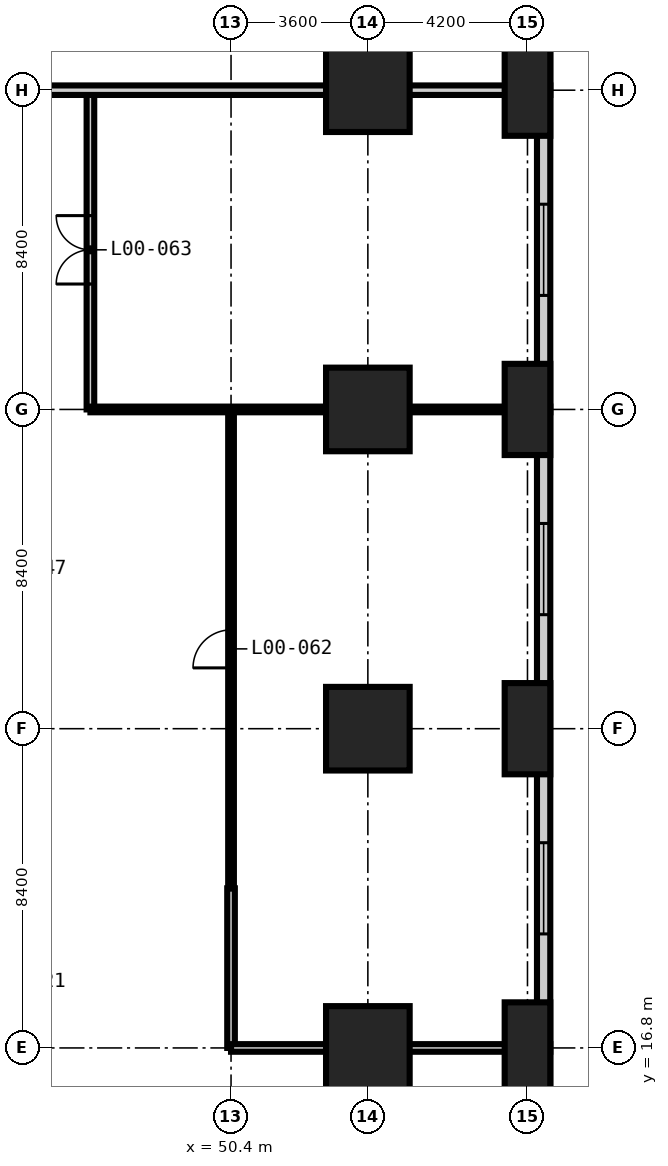
"""IFC4 building model, lengths in metres.
Left out: names, types, materials, properties, quantities, classifications, styles, units other than length and angle.
Written with IfcOpenShell. Run it as: python <this file> out.ifc"""

import sys

from ifc_helpers import new_model, si_unit, direction, frame, frame_2d, origin, origin_2d, place, context, subcontext, project, spatial, rectangle, extrude, element, fill, save


model = new_model("IFC4")
c1 = context("Model", 3, precision=1e-05, world=origin(), true_north=direction((0.0, 1.0)))
c2 = subcontext(c1, "Body", "Model", "MODEL_VIEW")
j1 = project(units=[si_unit("LENGTHUNIT", "METRE"), si_unit("PLANEANGLEUNIT", "RADIAN")], contexts=[c1])
p1 = place(None, origin())
s1 = spatial("IfcSite", under=j1, at=p1, CompositionType="ELEMENT")
p2 = place(p1, origin())
s2 = spatial("IfcBuilding", under=s1, at=p2, CompositionType="ELEMENT")
p3 = place(p2, origin())
s3 = spatial("IfcBuildingStorey", under=s2, at=p3, CompositionType="ELEMENT", Elevation=0.0)
for number, where, z_axis, x_axis in (
    (1, (54.0, 16.8, -0.3), (0.0, 0.0, 1.0), (1.0, 0.0, 0.0)),
    (2, (54.0, 25.2, -0.3), (0.0, 0.0, 1.0), (1.0, 0.0, 0.0)),
    (3, (54.0, 33.6, -0.3), (0.0, 0.0, 1.0), (1.0, 0.0, 0.0)),
    (4, (54.0, 42.0, -0.3), (0.0, 0.0, 1.0), (1.0, 0.0, 0.0)),
):
    element("IfcColumn", number, at=place(p3, frame(where, z_axis=z_axis, x_axis=x_axis)), inside=s3, PredefinedType="COLUMN", context=c2, shape_type="SweptSolid", body=[
        extrude(rectangle(XDim=2.2, YDim=2.2, at=origin_2d()), origin(), (0.0, 0.0, 1.0), 6.0),
    ])
for number, where, z_axis, x_axis in (
    (5, (58.2, 16.8, -0.3), (0.0, 0.0, 1.0), (1.0, 0.0, 0.0)),
    (6, (58.2, 25.2, -0.3), (0.0, 0.0, 1.0), (1.0, 0.0, 0.0)),
    (7, (58.2, 33.6, -0.3), (0.0, 0.0, 1.0), (1.0, 0.0, 0.0)),
    (8, (58.2, 42.0, -0.3), (0.0, 0.0, 1.0), (1.0, 0.0, 0.0)),
):
    element("IfcColumn", number, at=place(p3, frame(where, z_axis=z_axis, x_axis=x_axis)), inside=s3, PredefinedType="COLUMN", context=c2, shape_type="SweptSolid", body=[
        extrude(rectangle(XDim=1.2, YDim=2.4, at=origin_2d()), origin(), (0.0, 0.0, 1.0), 6.0),
    ])
p4 = place(p3, frame((58.625, -8.4, 0.0), z_axis=(0.0, 0.0, 1.0), x_axis=(0.0, 1.0, 0.0)))
e9 = element("IfcWall", 9, at=p4, inside=s3, PredefinedType="SOLIDWALL", context=c2, shape_type="SweptSolid", body=[
    extrude(rectangle(XDim=67.2, YDim=0.35, at=frame_2d((33.6, 0.0))), origin(), (0.0, 0.0, 1.0), 5.7),
])
p5 = place(p4, frame((3.0, 0.0, 0.9)))
e10 = element("IfcOpeningElement", 10, at=p5, cuts=e9, PredefinedType="OPENING", context=c2, shape_type="SweptSolid", body=[
    extrude(rectangle(XDim=2.4, YDim=2.4, at=frame_2d((1.2, 1.2))), frame((0.0, 0.185, 0.0), z_axis=(0.0, -1.0, 0.0), x_axis=(1.0, 0.0, 0.0)), (0.0, 0.0, 1.0), 0.37),
])
p6 = place(p4, frame((18.1, 0.0, 0.0)))
e11 = element("IfcOpeningElement", 11, at=p6, cuts=e9, PredefinedType="OPENING", context=c2, shape_type="SweptSolid", body=[
    extrude(rectangle(XDim=2.4, YDim=3.0, at=frame_2d((1.2, 1.5))), frame((0.0, 0.185, 0.0), z_axis=(0.0, -1.0, 0.0), x_axis=(1.0, 0.0, 0.0)), (0.0, 0.0, 1.0), 0.37),
])
p7 = place(p4, frame((11.4, 0.0, 0.9)))
e12 = element("IfcOpeningElement", 12, at=p7, cuts=e9, PredefinedType="OPENING", context=c2, shape_type="SweptSolid", body=[
    extrude(rectangle(XDim=2.4, YDim=2.4, at=frame_2d((1.2, 1.2))), frame((0.0, 0.185, 0.0), z_axis=(0.0, -1.0, 0.0), x_axis=(1.0, 0.0, 0.0)), (0.0, 0.0, 1.0), 0.37),
])
p8 = place(p4, frame((20.7, 0.0, 0.9)))
e13 = element("IfcOpeningElement", 13, at=p8, cuts=e9, PredefinedType="OPENING", context=c2, shape_type="SweptSolid", body=[
    extrude(rectangle(XDim=2.4, YDim=2.4, at=frame_2d((1.2, 1.2))), frame((0.0, 0.185, 0.0), z_axis=(0.0, -1.0, 0.0), x_axis=(1.0, 0.0, 0.0)), (0.0, 0.0, 1.0), 0.37),
])
p9 = place(p4, frame((28.2, 0.0, 0.9)))
e14 = element("IfcOpeningElement", 14, at=p9, cuts=e9, PredefinedType="OPENING", context=c2, shape_type="SweptSolid", body=[
    extrude(rectangle(XDim=2.4, YDim=2.4, at=frame_2d((1.2, 1.2))), frame((0.0, 0.185, 0.0), z_axis=(0.0, -1.0, 0.0), x_axis=(1.0, 0.0, 0.0)), (0.0, 0.0, 1.0), 0.37),
])
p10 = place(p4, frame((36.6, 0.0, 0.9)))
e15 = element("IfcOpeningElement", 15, at=p10, cuts=e9, PredefinedType="OPENING", context=c2, shape_type="SweptSolid", body=[
    extrude(rectangle(XDim=2.4, YDim=2.4, at=frame_2d((1.2, 1.2))), frame((0.0, 0.185, 0.0), z_axis=(0.0, -1.0, 0.0), x_axis=(1.0, 0.0, 0.0)), (0.0, 0.0, 1.0), 0.37),
])
p11 = place(p4, frame((45.0, 0.0, 0.9)))
e16 = element("IfcOpeningElement", 16, at=p11, cuts=e9, PredefinedType="OPENING", context=c2, shape_type="SweptSolid", body=[
    extrude(rectangle(XDim=2.4, YDim=2.4, at=frame_2d((1.2, 1.2))), frame((0.0, 0.185, 0.0), z_axis=(0.0, -1.0, 0.0), x_axis=(1.0, 0.0, 0.0)), (0.0, 0.0, 1.0), 0.37),
])
p12 = place(p4, frame((60.1, 0.0, 0.0)))
e17 = element("IfcOpeningElement", 17, at=p12, cuts=e9, PredefinedType="OPENING", context=c2, shape_type="SweptSolid", body=[
    extrude(rectangle(XDim=3.6, YDim=4.5, at=frame_2d((1.8, 2.25))), frame((0.0, 0.185, 0.0), z_axis=(0.0, -1.0, 0.0), x_axis=(1.0, 0.0, 0.0)), (0.0, 0.0, 1.0), 0.37),
])
p13 = place(p4, frame((53.4, 0.0, 0.9)))
e18 = element("IfcOpeningElement", 18, at=p13, cuts=e9, PredefinedType="OPENING", context=c2, shape_type="SweptSolid", body=[
    extrude(rectangle(XDim=2.4, YDim=2.4, at=frame_2d((1.2, 1.2))), frame((0.0, 0.185, 0.0), z_axis=(0.0, -1.0, 0.0), x_axis=(1.0, 0.0, 0.0)), (0.0, 0.0, 1.0), 0.37),
])
p14 = place(p3, frame((46.7, 33.6, 0.0), z_axis=(0.0, 0.0, 1.0), x_axis=(0.0, 1.0, 0.0)))
e19 = element("IfcWall", 19, at=p14, inside=s3, PredefinedType="PARTITIONING", context=c2, shape_type="SweptSolid", body=[
    extrude(rectangle(XDim=8.4, YDim=0.2, at=frame_2d((4.2, 0.0))), origin(), (0.0, 0.0, 1.0), 5.7),
])
p15 = place(p14, frame((3.3, 0.0, 0.0)))
e20 = element("IfcOpeningElement", 20, at=p15, cuts=e19, PredefinedType="OPENING", context=c2, shape_type="SweptSolid", body=[
    extrude(rectangle(XDim=1.8, YDim=2.4, at=frame_2d((0.9, 1.2))), frame((0.0, 0.11, 0.0), z_axis=(0.0, -1.0, 0.0), x_axis=(1.0, 0.0, 0.0)), (0.0, 0.0, 1.0), 0.22),
])
p16 = place(p3, frame((50.4, 16.8, 0.0), z_axis=(0.0, 0.0, 1.0), x_axis=(0.0, 1.0, 0.0)))
e21 = element("IfcWall", 21, at=p16, inside=s3, PredefinedType="PARTITIONING", context=c2, shape_type="SweptSolid", body=[
    extrude(rectangle(XDim=4.2, YDim=0.2, at=frame_2d((2.1, 0.0))), origin(), (0.0, 0.0, 1.0), 5.7),
])
p17 = place(p3, frame((54.6, 0.0, 0.0), z_axis=(0.0, 0.0, 1.0), x_axis=(0.0, 1.0, 0.0)))
e22 = element("IfcWall", 22, at=p17, inside=s3, PredefinedType="PARTITIONING", context=c2, shape_type="SweptSolid", body=[
    extrude(rectangle(XDim=16.8, YDim=0.2, at=frame_2d((8.4, 0.0))), origin(), (0.0, 0.0, 1.0), 5.7),
])
p18 = place(p17, frame((13.8, 0.0, 0.0)))
e23 = element("IfcOpeningElement", 23, at=p18, cuts=e22, PredefinedType="OPENING", context=c2, shape_type="SweptSolid", body=[
    extrude(rectangle(XDim=1.8, YDim=2.4, at=frame_2d((0.9, 1.2))), frame((0.0, 0.11, 0.0), z_axis=(0.0, -1.0, 0.0), x_axis=(1.0, 0.0, 0.0)), (0.0, 0.0, 1.0), 0.22),
])
p19 = place(p17, frame((5.4, 0.0, 0.0)))
e24 = element("IfcOpeningElement", 24, at=p19, cuts=e22, PredefinedType="OPENING", context=c2, shape_type="SweptSolid", body=[
    extrude(rectangle(XDim=1.8, YDim=2.4, at=frame_2d((0.9, 1.2))), frame((0.0, 0.11, 0.0), z_axis=(0.0, -1.0, 0.0), x_axis=(1.0, 0.0, 0.0)), (0.0, 0.0, 1.0), 0.22),
])
p20 = place(p3, frame((50.4, 16.8, 0.0), z_axis=(0.0, 0.0, 1.0), x_axis=(1.0, 0.0, 0.0)))
e25 = element("IfcWall", 25, at=p20, inside=s3, PredefinedType="PARTITIONING", context=c2, shape_type="SweptSolid", body=[
    extrude(rectangle(XDim=8.4, YDim=0.2, at=frame_2d((4.2, 0.0))), origin(), (0.0, 0.0, 1.0), 5.7),
])
p21 = place(p3, frame((43.5, 42.0, 0.0), z_axis=(0.0, 0.0, 1.0), x_axis=(1.0, 0.0, 0.0)))
e26 = element("IfcWall", 26, at=p21, inside=s3, PredefinedType="PARTITIONING", context=c2, shape_type="SweptSolid", body=[
    extrude(rectangle(XDim=15.3, YDim=0.25, at=frame_2d((7.65, 0.0))), origin(), (0.0, 0.0, 1.0), 5.7),
])
p22 = place(p3, frame((50.4, 21.0, 0.0), z_axis=(0.0, 0.0, 1.0), x_axis=(0.0, 1.0, 0.0)))
e27 = element("IfcWall", 27, at=p22, inside=s3, PredefinedType="PARTITIONING", context=c2, shape_type="SweptSolid", body=[
    extrude(rectangle(XDim=12.6, YDim=0.15, at=frame_2d((6.3, 0.0))), origin(), (0.0, 0.0, 1.0), 5.7),
])
p23 = place(p22, frame((5.8, 0.0, 0.0)))
e28 = element("IfcOpeningElement", 28, at=p23, cuts=e27, PredefinedType="OPENING", context=c2, shape_type="SweptSolid", body=[
    extrude(rectangle(XDim=1.0, YDim=2.1, at=frame_2d((0.5, 1.05))), frame((0.0, 0.085, 0.0), z_axis=(0.0, -1.0, 0.0), x_axis=(1.0, 0.0, 0.0)), (0.0, 0.0, 1.0), 0.17),
])
p24 = place(p3, frame((46.7, 33.6, 0.0), z_axis=(0.0, 0.0, 1.0), x_axis=(1.0, 0.0, 0.0)))
e29 = element("IfcWall", 29, at=p24, inside=s3, PredefinedType="PARTITIONING", context=c2, shape_type="SweptSolid", body=[
    extrude(rectangle(XDim=12.1, YDim=0.15, at=frame_2d((6.05, 0.0))), origin(), (0.0, 0.0, 1.0), 5.7),
])
p25 = place(p9, origin())
e30 = element("IfcWindow", 30, at=p25, inside=s3, PartitioningType="SINGLE_PANEL", PredefinedType="WINDOW", context=c2, shape_type="SweptSolid", body=[
    extrude(rectangle(XDim=2.4, YDim=2.4, at=frame_2d((1.2, 1.2))), frame((0.0, 0.03, 0.0), z_axis=(0.0, -1.0, 0.0), x_axis=(1.0, 0.0, 0.0)), (0.0, 0.0, 1.0), 0.06),
])
fill(e14, e30)
p26 = place(p10, origin())
e31 = element("IfcWindow", 31, at=p26, inside=s3, PartitioningType="SINGLE_PANEL", PredefinedType="WINDOW", context=c2, shape_type="SweptSolid", body=[
    extrude(rectangle(XDim=2.4, YDim=2.4, at=frame_2d((1.2, 1.2))), frame((0.0, 0.03, 0.0), z_axis=(0.0, -1.0, 0.0), x_axis=(1.0, 0.0, 0.0)), (0.0, 0.0, 1.0), 0.06),
])
fill(e15, e31)
p27 = place(p11, origin())
e32 = element("IfcWindow", 32, at=p27, inside=s3, PartitioningType="SINGLE_PANEL", PredefinedType="WINDOW", context=c2, shape_type="SweptSolid", body=[
    extrude(rectangle(XDim=2.4, YDim=2.4, at=frame_2d((1.2, 1.2))), frame((0.0, 0.03, 0.0), z_axis=(0.0, -1.0, 0.0), x_axis=(1.0, 0.0, 0.0)), (0.0, 0.0, 1.0), 0.06),
])
fill(e16, e32)
p28 = place(p23, origin())
e33 = element("IfcDoor", 33, at=p28, inside=s3, OperationType="SINGLE_SWING_LEFT", PredefinedType="DOOR", context=c2, shape_type="SweptSolid", body=[
    extrude(rectangle(XDim=1.0, YDim=2.1, at=frame_2d((0.5, 1.05))), frame((0.0, 0.025, 0.0), z_axis=(0.0, -1.0, 0.0), x_axis=(1.0, 0.0, 0.0)), (0.0, 0.0, 1.0), 0.05),
])
fill(e28, e33)
p29 = place(p15, origin())
e34 = element("IfcDoor", 34, at=p29, inside=s3, OperationType="DOUBLE_DOOR_DOUBLE_SWING", PredefinedType="DOOR", context=c2, shape_type="SweptSolid", body=[
    extrude(rectangle(XDim=1.8, YDim=2.4, at=frame_2d((0.9, 1.2))), frame((0.0, 0.025, 0.0), z_axis=(0.0, -1.0, 0.0), x_axis=(1.0, 0.0, 0.0)), (0.0, 0.0, 1.0), 0.05),
])
fill(e20, e34)
save(model, sys.argv[1])
